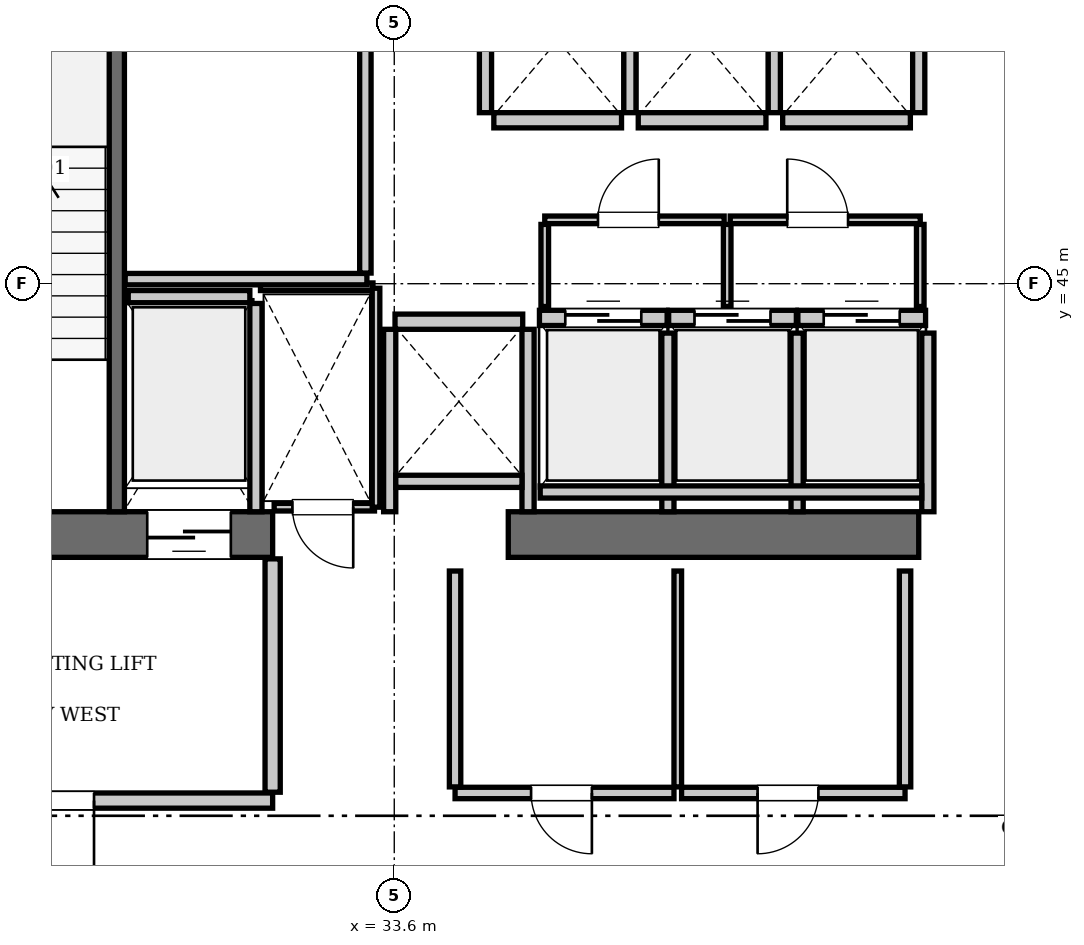
"""IFC4 building model, lengths in metres.
Left out: names, types, materials, properties, quantities, classifications, styles, units other than length and angle.
Written with IfcOpenShell. Run it as: python <this file> out.ifc"""

import sys

from ifc_helpers import new_model, si_unit, direction, frame, frame_2d, origin, place, context, subcontext, project, spatial, rectangle, extrude, element, fill, save


model = new_model("IFC4")
c1 = context("Model", 3, precision=1e-05, world=origin(), true_north=direction((0.0, 1.0)))
c2 = subcontext(c1, "Body", "Model", "MODEL_VIEW")
j1 = project(units=[si_unit("LENGTHUNIT", "METRE"), si_unit("PLANEANGLEUNIT", "RADIAN")], contexts=[c1])
p1 = place(None, origin())
s1 = spatial("IfcSite", under=j1, at=p1, CompositionType="ELEMENT")
p2 = place(p1, origin())
s2 = spatial("IfcBuilding", under=s1, at=p2, CompositionType="ELEMENT")
p3 = place(p2, frame((0.0, 0.0, 301.0)))
s3 = spatial("IfcBuildingStorey", under=s2, at=p3, CompositionType="ELEMENT", Elevation=301.0)
p4 = place(p3, frame((25.2, 41.7, 0.0), z_axis=(0.0, 0.0, 1.0), x_axis=(1.0, 0.0, 0.0)))
e1 = element("IfcWall", 1, at=p4, inside=s3, PredefinedType="SHEAR", context=c2, shape_type="SweptSolid", body=[
    extrude(rectangle(XDim=6.8, YDim=0.6, at=frame_2d((3.4, 0.0))), origin(), (0.0, 0.0, 1.0), 3.85),
])
p5 = place(p4, frame((1.65, 0.0, 0.0)))
e2 = element("IfcOpeningElement", 2, at=p5, cuts=e1, PredefinedType="OPENING", context=c2, shape_type="SweptSolid", body=[
    extrude(rectangle(XDim=1.15, YDim=2.15, at=frame_2d((0.575, 1.075))), frame((0.0, 0.31, 0.0), z_axis=(0.0, -1.0, 0.0), x_axis=(1.0, 0.0, 0.0)), (0.0, 0.0, 1.0), 0.62),
])
p6 = place(p4, frame((5.15, 0.0, 0.0)))
e3 = element("IfcOpeningElement", 3, at=p6, cuts=e1, PredefinedType="OPENING", context=c2, shape_type="SweptSolid", body=[
    extrude(rectangle(XDim=1.1, YDim=2.2, at=frame_2d((0.55, 1.1))), frame((0.0, 0.31, 0.0), z_axis=(0.0, -1.0, 0.0), x_axis=(1.0, 0.0, 0.0)), (0.0, 0.0, 1.0), 0.62),
])
p7 = place(p3, frame((35.1, 41.7, 0.0), z_axis=(0.0, 0.0, 1.0), x_axis=(1.0, 0.0, 0.0)))
e4 = element("IfcWall", 4, at=p7, inside=s3, PredefinedType="SHEAR", context=c2, shape_type="SweptSolid", body=[
    extrude(rectangle(XDim=5.4, YDim=0.6, at=frame_2d((2.7, 0.0))), origin(), (0.0, 0.0, 1.0), 3.85),
])
p8 = place(p3, frame((29.95, 42.0, 0.0), z_axis=(0.0, 0.0, 1.0), x_axis=(0.0, 1.0, 0.0)))
e5 = element("IfcWall", 5, at=p8, inside=s3, PredefinedType="SOLIDWALL", context=c2, shape_type="SweptSolid", body=[
    extrude(rectangle(XDim=9.15, YDim=0.2, at=frame_2d((4.575, 0.0))), origin(), (0.0, 0.0, 1.0), 3.61),
])
p9 = place(p3, frame((35.51, 44.55, 0.0), z_axis=(0.0, 0.0, 1.0), x_axis=(1.0, 0.0, 0.0)))
e6 = element("IfcWall", 6, at=p9, inside=s3, PredefinedType="SOLIDWALL", context=c2, shape_type="SweptSolid", body=[
    extrude(rectangle(XDim=1.68, YDim=0.2, at=frame_2d((0.84, 0.0))), origin(), (0.0, 0.0, 1.0), 3.61),
])
p10 = place(p9, frame((0.34, 0.0, 0.0)))
e7 = element("IfcOpeningElement", 7, at=p10, cuts=e6, PredefinedType="OPENING", context=c2, shape_type="SweptSolid", body=[
    extrude(rectangle(XDim=1.0, YDim=2.15, at=frame_2d((0.5, 1.075))), frame((0.0, 0.11, 0.0), z_axis=(0.0, -1.0, 0.0), x_axis=(1.0, 0.0, 0.0)), (0.0, 0.0, 1.0), 0.22),
])
p11 = place(p3, frame((37.21, 44.55, 0.0), z_axis=(0.0, 0.0, 1.0), x_axis=(1.0, 0.0, 0.0)))
e8 = element("IfcWall", 8, at=p11, inside=s3, PredefinedType="SOLIDWALL", context=c2, shape_type="SweptSolid", body=[
    extrude(rectangle(XDim=1.68, YDim=0.2, at=frame_2d((0.84, 0.0))), origin(), (0.0, 0.0, 1.0), 3.61),
])
p12 = place(p11, frame((0.34, 0.0, 0.0)))
e9 = element("IfcOpeningElement", 9, at=p12, cuts=e8, PredefinedType="OPENING", context=c2, shape_type="SweptSolid", body=[
    extrude(rectangle(XDim=1.0, YDim=2.15, at=frame_2d((0.5, 1.075))), frame((0.0, 0.11, 0.0), z_axis=(0.0, -1.0, 0.0), x_axis=(1.0, 0.0, 0.0)), (0.0, 0.0, 1.0), 0.22),
])
p13 = place(p3, frame((38.91, 44.55, 0.0), z_axis=(0.0, 0.0, 1.0), x_axis=(1.0, 0.0, 0.0)))
e10 = element("IfcWall", 10, at=p13, inside=s3, PredefinedType="SOLIDWALL", context=c2, shape_type="SweptSolid", body=[
    extrude(rectangle(XDim=1.68, YDim=0.2, at=frame_2d((0.84, 0.0))), origin(), (0.0, 0.0, 1.0), 3.61),
])
p14 = place(p13, frame((0.34, 0.0, 0.0)))
e11 = element("IfcOpeningElement", 11, at=p14, cuts=e10, PredefinedType="OPENING", context=c2, shape_type="SweptSolid", body=[
    extrude(rectangle(XDim=1.0, YDim=2.15, at=frame_2d((0.5, 1.075))), frame((0.0, 0.11, 0.0), z_axis=(0.0, -1.0, 0.0), x_axis=(1.0, 0.0, 0.0)), (0.0, 0.0, 1.0), 0.22),
])
p15 = place(p3, frame((34.91, 47.15, 0.0), z_axis=(0.0, 0.0, 1.0), x_axis=(1.0, 0.0, 0.0)))
e12 = element("IfcWall", 12, at=p15, inside=s3, PredefinedType="SOLIDWALL", context=c2, shape_type="SweptSolid", body=[
    extrude(rectangle(XDim=1.68, YDim=0.2, at=frame_2d((0.84, 0.0))), origin(), (0.0, 0.0, 1.0), 3.61),
])
for number, where, z_axis, x_axis in (
    (13, (36.81, 47.15, 0.0), (0.0, 0.0, 1.0), (1.0, 0.0, 0.0)),
    (14, (38.71, 47.15, 0.0), (0.0, 0.0, 1.0), (1.0, 0.0, 0.0)),
    (15, (33.61, 44.5, 0.0), (0.0, 0.0, 1.0), (1.0, 0.0, 0.0)),
):
    element("IfcWall", number, at=place(p3, frame(where, z_axis=z_axis, x_axis=x_axis)), inside=s3, PredefinedType="SOLIDWALL", context=c2, shape_type="SweptSolid", body=[
        extrude(rectangle(XDim=1.68, YDim=0.2, at=frame_2d((0.84, 0.0))), origin(), (0.0, 0.0, 1.0), 3.61),
    ])
p16 = place(p3, frame((30.1, 44.83, 0.0), z_axis=(0.0, 0.0, 1.0), x_axis=(1.0, 0.0, 0.0)))
e16 = element("IfcWall", 16, at=p16, inside=s3, PredefinedType="SOLIDWALL", context=c2, shape_type="SweptSolid", body=[
    extrude(rectangle(XDim=1.6, YDim=0.16, at=frame_2d((0.8, 0.0))), origin(), (0.0, 0.0, 1.0), 3.61),
])
p17 = place(p3, frame((31.78, 42.0, 0.0), z_axis=(0.0, 0.0, 1.0), x_axis=(0.0, 1.0, 0.0)))
e17 = element("IfcWall", 17, at=p17, inside=s3, PredefinedType="SOLIDWALL", context=c2, shape_type="SweptSolid", body=[
    extrude(rectangle(XDim=2.74, YDim=0.16, at=frame_2d((1.37, 0.0))), origin(), (0.0, 0.0, 1.0), 3.61),
])
for number, where, z_axis, x_axis in (
    (18, (37.2, 42.0, 0.0), (0.0, 0.0, 1.0), (0.0, 1.0, 0.0)),
    (19, (38.9, 42.0, 0.0), (0.0, 0.0, 1.0), (0.0, 1.0, 0.0)),
    (20, (40.62, 42.0, 0.0), (0.0, 0.0, 1.0), (0.0, 1.0, 0.0)),
):
    element("IfcWall", number, at=place(p3, frame(where, z_axis=z_axis, x_axis=x_axis)), inside=s3, PredefinedType="SOLIDWALL", context=c2, shape_type="SweptSolid", body=[
        extrude(rectangle(XDim=2.35, YDim=0.16, at=frame_2d((1.175, 0.0))), origin(), (0.0, 0.0, 1.0), 3.61),
    ])
p18 = place(p3, frame((35.52, 42.26, 0.0), z_axis=(0.0, 0.0, 1.0), x_axis=(1.0, 0.0, 0.0)))
e21 = element("IfcWall", 21, at=p18, inside=s3, PredefinedType="SOLIDWALL", context=c2, shape_type="SweptSolid", body=[
    extrude(rectangle(XDim=5.02, YDim=0.16, at=frame_2d((2.51, 0.0))), origin(), (0.0, 0.0, 1.0), 3.61),
])
for number, where, z_axis, x_axis in (
    (22, (34.8, 47.25, 0.0), (0.0, 0.0, 1.0), (0.0, 1.0, 0.0)),
    (23, (36.7, 47.25, 0.0), (0.0, 0.0, 1.0), (0.0, 1.0, 0.0)),
    (24, (38.6, 47.25, 0.0), (0.0, 0.0, 1.0), (0.0, 1.0, 0.0)),
    (25, (40.5, 47.25, 0.0), (0.0, 0.0, 1.0), (0.0, 1.0, 0.0)),
):
    element("IfcWall", number, at=place(p3, frame(where, z_axis=z_axis, x_axis=x_axis)), inside=s3, PredefinedType="SOLIDWALL", context=c2, shape_type="SweptSolid", body=[
        extrude(rectangle(XDim=2.19, YDim=0.16, at=frame_2d((1.095, 0.0))), origin(), (0.0, 0.0, 1.0), 3.61),
    ])
for number, where, z_axis, x_axis in (
    (26, (33.54, 42.0, 0.0), (0.0, 0.0, 1.0), (0.0, 1.0, 0.0)),
    (27, (35.36, 42.0, 0.0), (0.0, 0.0, 1.0), (0.0, 1.0, 0.0)),
):
    element("IfcWall", number, at=place(p3, frame(where, z_axis=z_axis, x_axis=x_axis)), inside=s3, PredefinedType="SOLIDWALL", context=c2, shape_type="SweptSolid", body=[
        extrude(rectangle(XDim=2.4, YDim=0.16, at=frame_2d((1.2, 0.0))), origin(), (0.0, 0.0, 1.0), 3.61),
    ])
p19 = place(p3, frame((33.62, 42.4, 0.0), z_axis=(0.0, 0.0, 1.0), x_axis=(1.0, 0.0, 0.0)))
e28 = element("IfcWall", 28, at=p19, inside=s3, PredefinedType="SOLIDWALL", context=c2, shape_type="SweptSolid", body=[
    extrude(rectangle(XDim=1.66, YDim=0.16, at=frame_2d((0.83, 0.0))), origin(), (0.0, 0.0, 1.0), 3.61),
])
p20 = place(p3, frame((26.2, 38.2, 0.0), z_axis=(0.0, 0.0, 1.0), x_axis=(1.0, 0.0, 0.0)))
e29 = element("IfcWall", 29, at=p20, inside=s3, PredefinedType="PARTITIONING", context=c2, shape_type="SweptSolid", body=[
    extrude(rectangle(XDim=5.8, YDim=0.2, at=frame_2d((2.9, 0.0))), origin(), (0.0, 0.0, 1.0), 3.61),
])
p21 = place(p20, frame((2.3, 0.0, 0.0)))
e30 = element("IfcOpeningElement", 30, at=p21, cuts=e29, PredefinedType="OPENING", context=c2, shape_type="SweptSolid", body=[
    extrude(rectangle(XDim=1.15, YDim=2.15, at=frame_2d((0.575, 1.075))), frame((0.0, 0.11, 0.0), z_axis=(0.0, -1.0, 0.0), x_axis=(1.0, 0.0, 0.0)), (0.0, 0.0, 1.0), 0.22),
])
p22 = place(p3, frame((32.0, 38.31, 0.0), z_axis=(0.0, 0.0, 1.0), x_axis=(0.0, 1.0, 0.0)))
e31 = element("IfcWall", 31, at=p22, inside=s3, PredefinedType="PARTITIONING", context=c2, shape_type="SweptSolid", body=[
    extrude(rectangle(XDim=3.07, YDim=0.2, at=frame_2d((1.535, 0.0))), origin(), (0.0, 0.0, 1.0), 3.61),
])
p23 = place(p3, frame((32.02, 42.06, 0.0), z_axis=(0.0, 0.0, 1.0), x_axis=(1.0, 0.0, 0.0)))
e32 = element("IfcWall", 32, at=p23, inside=s3, PredefinedType="PARTITIONING", context=c2, shape_type="SweptSolid", body=[
    extrude(rectangle(XDim=1.32, YDim=0.1, at=frame_2d((0.66, 0.0))), origin(), (0.0, 0.0, 1.0), 3.61),
])
p24 = place(p23, frame((0.24, 0.0, 0.0)))
e33 = element("IfcOpeningElement", 33, at=p24, cuts=e32, PredefinedType="OPENING", context=c2, shape_type="SweptSolid", body=[
    extrude(rectangle(XDim=0.8, YDim=2.05, at=frame_2d((0.4, 1.025))), frame((0.0, 0.06, 0.0), z_axis=(0.0, -1.0, 0.0), x_axis=(1.0, 0.0, 0.0)), (0.0, 0.0, 1.0), 0.12),
])
p25 = place(p3, frame((31.84, 44.96, 0.0), z_axis=(0.0, 0.0, 1.0), x_axis=(1.0, 0.0, 0.0)))
e34 = element("IfcWall", 34, at=p25, inside=s3, PredefinedType="PARTITIONING", context=c2, shape_type="SweptSolid", body=[
    extrude(rectangle(XDim=1.48, YDim=0.1, at=frame_2d((0.74, 0.0))), origin(), (0.0, 0.0, 1.0), 3.61),
])
p26 = place(p3, frame((33.36, 42.06, 0.0), z_axis=(0.0, 0.0, 1.0), x_axis=(0.0, 1.0, 0.0)))
e35 = element("IfcWall", 35, at=p26, inside=s3, PredefinedType="PARTITIONING", context=c2, shape_type="SweptSolid", body=[
    extrude(rectangle(XDim=2.88, YDim=0.1, at=frame_2d((1.44, 0.0))), origin(), (0.0, 0.0, 1.0), 3.61),
])
p27 = place(p3, frame((35.58, 45.84, 0.0), z_axis=(0.0, 0.0, 1.0), x_axis=(1.0, 0.0, 0.0)))
e36 = element("IfcWall", 36, at=p27, inside=s3, PredefinedType="PARTITIONING", context=c2, shape_type="SweptSolid", body=[
    extrude(rectangle(XDim=2.36, YDim=0.1, at=frame_2d((1.18, 0.0))), origin(), (0.0, 0.0, 1.0), 3.61),
])
p28 = place(p27, frame((0.7, 0.0, 0.0)))
e37 = element("IfcOpeningElement", 37, at=p28, cuts=e36, PredefinedType="OPENING", context=c2, shape_type="SweptSolid", body=[
    extrude(rectangle(XDim=0.8, YDim=2.05, at=frame_2d((0.4, 1.025))), frame((0.0, 0.06, 0.0), z_axis=(0.0, -1.0, 0.0), x_axis=(1.0, 0.0, 0.0)), (0.0, 0.0, 1.0), 0.12),
])
p29 = place(p3, frame((38.02, 45.84, 0.0), z_axis=(0.0, 0.0, 1.0), x_axis=(1.0, 0.0, 0.0)))
e38 = element("IfcWall", 38, at=p29, inside=s3, PredefinedType="PARTITIONING", context=c2, shape_type="SweptSolid", body=[
    extrude(rectangle(XDim=2.5, YDim=0.1, at=frame_2d((1.25, 0.0))), origin(), (0.0, 0.0, 1.0), 3.61),
])
p30 = place(p29, frame((0.75, 0.0, 0.0)))
e39 = element("IfcOpeningElement", 39, at=p30, cuts=e38, PredefinedType="OPENING", context=c2, shape_type="SweptSolid", body=[
    extrude(rectangle(XDim=0.8, YDim=2.05, at=frame_2d((0.4, 1.025))), frame((0.0, 0.06, 0.0), z_axis=(0.0, -1.0, 0.0), x_axis=(1.0, 0.0, 0.0)), (0.0, 0.0, 1.0), 0.12),
])
for number, where, z_axis, x_axis in (
    (40, (35.58, 44.7, 0.0), (0.0, 0.0, 1.0), (0.0, 1.0, 0.0)),
    (41, (37.98, 44.7, 0.0), (0.0, 0.0, 1.0), (0.0, 1.0, 0.0)),
    (42, (40.52, 44.7, 0.0), (0.0, 0.0, 1.0), (0.0, 1.0, 0.0)),
):
    element("IfcWall", number, at=place(p3, frame(where, z_axis=z_axis, x_axis=x_axis)), inside=s3, PredefinedType="PARTITIONING", context=c2, shape_type="SweptSolid", body=[
        extrude(rectangle(XDim=1.08, YDim=0.1, at=frame_2d((0.54, 0.0))), origin(), (0.0, 0.0, 1.0), 3.61),
    ])
p31 = place(p3, frame((30.06, 45.06, 0.0), z_axis=(0.0, 0.0, 1.0), x_axis=(1.0, 0.0, 0.0)))
e43 = element("IfcWall", 43, at=p31, inside=s3, PredefinedType="PARTITIONING", context=c2, shape_type="SweptSolid", body=[
    extrude(rectangle(XDim=3.18, YDim=0.15, at=frame_2d((1.59, 0.0))), origin(), (0.0, 0.0, 1.0), 3.61),
])
p32 = place(p3, frame((33.22, 45.14, 0.0), z_axis=(0.0, 0.0, 1.0), x_axis=(0.0, 1.0, 0.0)))
e44 = element("IfcWall", 44, at=p32, inside=s3, PredefinedType="PARTITIONING", context=c2, shape_type="SweptSolid", body=[
    extrude(rectangle(XDim=4.16, YDim=0.15, at=frame_2d((2.08, 0.0))), origin(), (0.0, 0.0, 1.0), 3.61),
])
p33 = place(p3, frame((34.4, 38.3, 0.0), z_axis=(0.0, 0.0, 1.0), x_axis=(1.0, 0.0, 0.0)))
e45 = element("IfcWall", 45, at=p33, inside=s3, PredefinedType="PARTITIONING", context=c2, shape_type="SweptSolid", body=[
    extrude(rectangle(XDim=2.88, YDim=0.15, at=frame_2d((1.44, 0.0))), origin(), (0.0, 0.0, 1.0), 3.61),
])
p34 = place(p33, frame((1.0, 0.0, 0.0)))
e46 = element("IfcOpeningElement", 46, at=p34, cuts=e45, PredefinedType="OPENING", context=c2, shape_type="SweptSolid", body=[
    extrude(rectangle(XDim=0.8, YDim=2.05, at=frame_2d((0.4, 1.025))), frame((0.0, 0.085, 0.0), z_axis=(0.0, -1.0, 0.0), x_axis=(1.0, 0.0, 0.0)), (0.0, 0.0, 1.0), 0.17),
])
p35 = place(p3, frame((37.38, 38.3, 0.0), z_axis=(0.0, 0.0, 1.0), x_axis=(1.0, 0.0, 0.0)))
e47 = element("IfcWall", 47, at=p35, inside=s3, PredefinedType="PARTITIONING", context=c2, shape_type="SweptSolid", body=[
    extrude(rectangle(XDim=2.94, YDim=0.15, at=frame_2d((1.47, 0.0))), origin(), (0.0, 0.0, 1.0), 3.61),
])
p36 = place(p35, frame((1.0, 0.0, 0.0)))
e48 = element("IfcOpeningElement", 48, at=p36, cuts=e47, PredefinedType="OPENING", context=c2, shape_type="SweptSolid", body=[
    extrude(rectangle(XDim=0.8, YDim=2.05, at=frame_2d((0.4, 1.025))), frame((0.0, 0.085, 0.0), z_axis=(0.0, -1.0, 0.0), x_axis=(1.0, 0.0, 0.0)), (0.0, 0.0, 1.0), 0.17),
])
p37 = place(p3, frame((34.4, 38.38, 0.0), z_axis=(0.0, 0.0, 1.0), x_axis=(0.0, 1.0, 0.0)))
e49 = element("IfcWall", 49, at=p37, inside=s3, PredefinedType="PARTITIONING", context=c2, shape_type="SweptSolid", body=[
    extrude(rectangle(XDim=2.84, YDim=0.15, at=frame_2d((1.42, 0.0))), origin(), (0.0, 0.0, 1.0), 3.61),
])
p38 = place(p3, frame((37.33, 38.38, 0.0), z_axis=(0.0, 0.0, 1.0), x_axis=(0.0, 1.0, 0.0)))
e50 = element("IfcWall", 50, at=p38, inside=s3, PredefinedType="PARTITIONING", context=c2, shape_type="SweptSolid", body=[
    extrude(rectangle(XDim=2.84, YDim=0.1, at=frame_2d((1.42, 0.0))), origin(), (0.0, 0.0, 1.0), 3.61),
])
p39 = place(p3, frame((40.32, 38.38, 0.0), z_axis=(0.0, 0.0, 1.0), x_axis=(0.0, 1.0, 0.0)))
e51 = element("IfcWall", 51, at=p39, inside=s3, PredefinedType="PARTITIONING", context=c2, shape_type="SweptSolid", body=[
    extrude(rectangle(XDim=2.84, YDim=0.15, at=frame_2d((1.42, 0.0))), origin(), (0.0, 0.0, 1.0), 3.61),
])
p40 = place(p10, origin())
e52 = element("IfcDoor", 52, at=p40, inside=s3, OperationType="SLIDING_TO_LEFT", PredefinedType="DOOR", context=c2, shape_type="SweptSolid", body=[
    extrude(rectangle(XDim=1.0, YDim=2.15, at=frame_2d((0.5, 1.075))), frame((0.0, 0.025, 0.0), z_axis=(0.0, -1.0, 0.0), x_axis=(1.0, 0.0, 0.0)), (0.0, 0.0, 1.0), 0.05),
])
fill(e7, e52)
p41 = place(p12, origin())
e53 = element("IfcDoor", 53, at=p41, inside=s3, OperationType="SLIDING_TO_LEFT", PredefinedType="DOOR", context=c2, shape_type="SweptSolid", body=[
    extrude(rectangle(XDim=1.0, YDim=2.15, at=frame_2d((0.5, 1.075))), frame((0.0, 0.025, 0.0), z_axis=(0.0, -1.0, 0.0), x_axis=(1.0, 0.0, 0.0)), (0.0, 0.0, 1.0), 0.05),
])
fill(e9, e53)
p42 = place(p14, origin())
e54 = element("IfcDoor", 54, at=p42, inside=s3, OperationType="SLIDING_TO_LEFT", PredefinedType="DOOR", context=c2, shape_type="SweptSolid", body=[
    extrude(rectangle(XDim=1.0, YDim=2.15, at=frame_2d((0.5, 1.075))), frame((0.0, 0.025, 0.0), z_axis=(0.0, -1.0, 0.0), x_axis=(1.0, 0.0, 0.0)), (0.0, 0.0, 1.0), 0.05),
])
fill(e11, e54)
p43 = place(p6, frame((1.1, 0.0, 0.0), z_axis=(0.0, 0.0, 1.0), x_axis=(-1.0, 0.0, 0.0)))
e55 = element("IfcDoor", 55, at=p43, inside=s3, OperationType="SLIDING_TO_LEFT", PredefinedType="DOOR", context=c2, shape_type="SweptSolid", body=[
    extrude(rectangle(XDim=1.1, YDim=2.2, at=frame_2d((0.55, 1.1))), frame((0.0, 0.025, 0.0), z_axis=(0.0, -1.0, 0.0), x_axis=(1.0, 0.0, 0.0)), (0.0, 0.0, 1.0), 0.05),
])
fill(e3, e55)
p44 = place(p21, frame((1.15, 0.0, 0.0), z_axis=(0.0, 0.0, 1.0), x_axis=(-1.0, 0.0, 0.0)))
e56 = element("IfcDoor", 56, at=p44, inside=s3, OperationType="SINGLE_SWING_LEFT", PredefinedType="DOOR", context=c2, shape_type="SweptSolid", body=[
    extrude(rectangle(XDim=1.15, YDim=2.15, at=frame_2d((0.575, 1.075))), frame((0.0, 0.025, 0.0), z_axis=(0.0, -1.0, 0.0), x_axis=(1.0, 0.0, 0.0)), (0.0, 0.0, 1.0), 0.05),
])
fill(e30, e56)
p45 = place(p24, frame((0.8, 0.0, 0.0), z_axis=(0.0, 0.0, 1.0), x_axis=(-1.0, 0.0, 0.0)))
e57 = element("IfcDoor", 57, at=p45, inside=s3, OperationType="SINGLE_SWING_LEFT", PredefinedType="DOOR", context=c2, shape_type="SweptSolid", body=[
    extrude(rectangle(XDim=0.8, YDim=2.05, at=frame_2d((0.4, 1.025))), frame((0.0, 0.025, 0.0), z_axis=(0.0, -1.0, 0.0), x_axis=(1.0, 0.0, 0.0)), (0.0, 0.0, 1.0), 0.05),
])
fill(e33, e57)
p46 = place(p28, origin())
e58 = element("IfcDoor", 58, at=p46, inside=s3, OperationType="SINGLE_SWING_RIGHT", PredefinedType="DOOR", context=c2, shape_type="SweptSolid", body=[
    extrude(rectangle(XDim=0.8, YDim=2.05, at=frame_2d((0.4, 1.025))), frame((0.0, 0.025, 0.0), z_axis=(0.0, -1.0, 0.0), x_axis=(1.0, 0.0, 0.0)), (0.0, 0.0, 1.0), 0.05),
])
fill(e37, e58)
p47 = place(p30, origin())
e59 = element("IfcDoor", 59, at=p47, inside=s3, OperationType="SINGLE_SWING_LEFT", PredefinedType="DOOR", context=c2, shape_type="SweptSolid", body=[
    extrude(rectangle(XDim=0.8, YDim=2.05, at=frame_2d((0.4, 1.025))), frame((0.0, 0.025, 0.0), z_axis=(0.0, -1.0, 0.0), x_axis=(1.0, 0.0, 0.0)), (0.0, 0.0, 1.0), 0.05),
])
fill(e39, e59)
p48 = place(p34, frame((0.8, 0.0, 0.0), z_axis=(0.0, 0.0, 1.0), x_axis=(-1.0, 0.0, 0.0)))
e60 = element("IfcDoor", 60, at=p48, inside=s3, OperationType="SINGLE_SWING_LEFT", PredefinedType="DOOR", context=c2, shape_type="SweptSolid", body=[
    extrude(rectangle(XDim=0.8, YDim=2.05, at=frame_2d((0.4, 1.025))), frame((0.0, 0.025, 0.0), z_axis=(0.0, -1.0, 0.0), x_axis=(1.0, 0.0, 0.0)), (0.0, 0.0, 1.0), 0.05),
])
fill(e46, e60)
p49 = place(p36, frame((0.8, 0.0, 0.0), z_axis=(0.0, 0.0, 1.0), x_axis=(-1.0, 0.0, 0.0)))
e61 = element("IfcDoor", 61, at=p49, inside=s3, OperationType="SINGLE_SWING_RIGHT", PredefinedType="DOOR", context=c2, shape_type="SweptSolid", body=[
    extrude(rectangle(XDim=0.8, YDim=2.05, at=frame_2d((0.4, 1.025))), frame((0.0, 0.025, 0.0), z_axis=(0.0, -1.0, 0.0), x_axis=(1.0, 0.0, 0.0)), (0.0, 0.0, 1.0), 0.05),
])
fill(e48, e61)
save(model, sys.argv[1])
